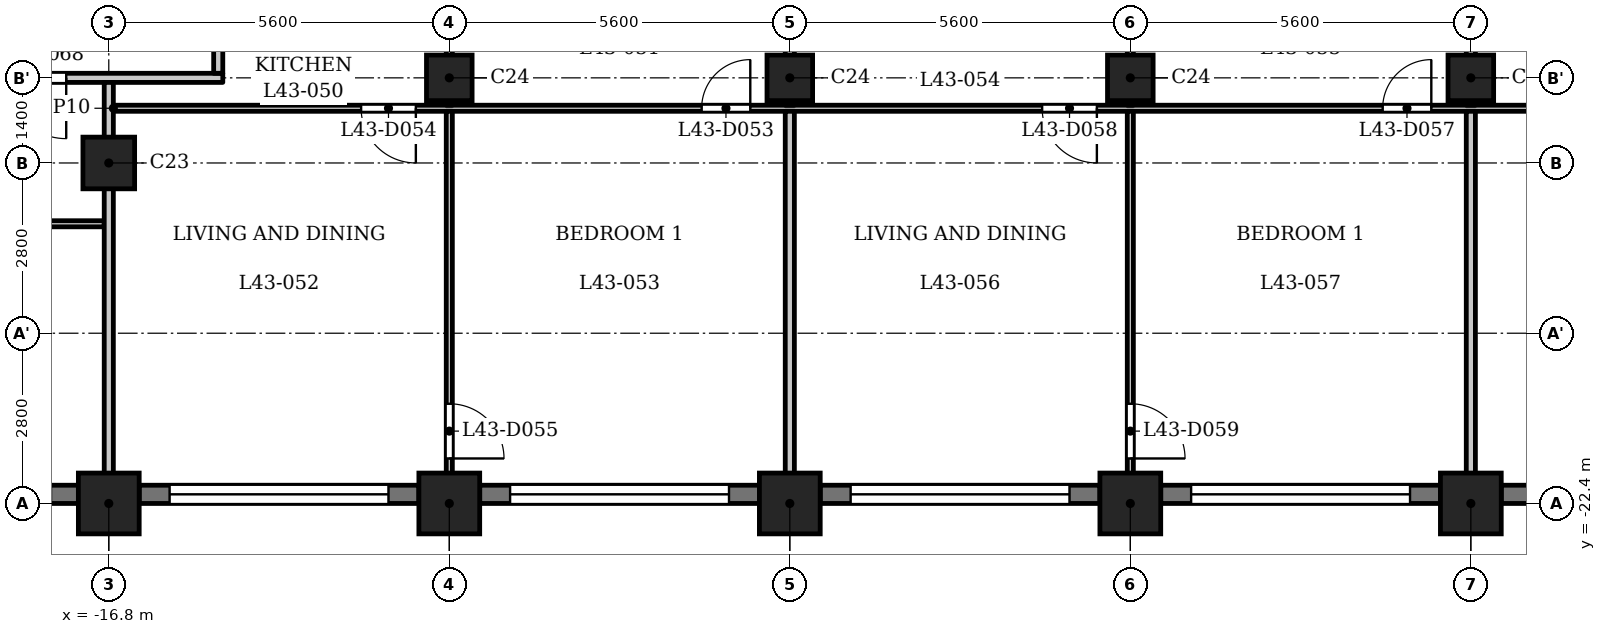
"""IFC4 building model, lengths in metres.
Left out: names, types, materials, properties, quantities, classifications, styles, units other than length and angle.
Written with IfcOpenShell. Run it as: python <this file> out.ifc"""

import sys

from ifc_helpers import new_model, si_unit, direction, frame, frame_2d, origin, origin_2d, place, context, subcontext, project, spatial, rectangle, extrude, element, fill, save


model = new_model("IFC4")
c1 = context("Model", 3, precision=1e-05, world=origin(), true_north=direction((0.0, 1.0)))
c2 = subcontext(c1, "Body", "Model", "MODEL_VIEW")
j1 = project(units=[si_unit("LENGTHUNIT", "METRE"), si_unit("PLANEANGLEUNIT", "RADIAN")], contexts=[c1])
p1 = place(None, origin())
s1 = spatial("IfcSite", under=j1, at=p1, CompositionType="ELEMENT")
p2 = place(p1, origin())
s2 = spatial("IfcBuilding", under=s1, at=p2, CompositionType="ELEMENT")
p3 = place(p2, frame((0.0, 0.0, 167.6)))
s3 = spatial("IfcBuildingStorey", under=s2, at=p3, CompositionType="ELEMENT", Elevation=167.6)
for number, where, z_axis, x_axis in (
    (1, (-16.8, -22.4, 0.0), (0.0, 0.0, 1.0), (1.0, 0.0, 0.0)),
    (2, (-11.2, -22.4, 0.0), (0.0, 0.0, 1.0), (1.0, 0.0, 0.0)),
    (3, (-5.6, -22.4, 0.0), (0.0, 0.0, 1.0), (1.0, 0.0, 0.0)),
    (4, (0.0, -22.4, 0.0), (0.0, 0.0, 1.0), (1.0, 0.0, 0.0)),
    (5, (5.6, -22.4, 0.0), (0.0, 0.0, 1.0), (1.0, 0.0, 0.0)),
):
    element("IfcColumn", number, at=place(p3, frame(where, z_axis=z_axis, x_axis=x_axis)), inside=s3, PredefinedType="COLUMN", context=c2, shape_type="SweptSolid", body=[
        extrude(rectangle(XDim=1.0, YDim=1.0, at=origin_2d()), origin(), (0.0, 0.0, 1.0), 3.5),
    ])
p4 = place(p3, frame((-16.8, -16.8, 0.0), z_axis=(0.0, 0.0, 1.0), x_axis=(1.0, 0.0, 0.0)))
e6 = element("IfcColumn", 6, at=p4, inside=s3, PredefinedType="COLUMN", context=c2, shape_type="SweptSolid", body=[
    extrude(rectangle(XDim=0.85, YDim=0.85, at=origin_2d()), origin(), (0.0, 0.0, 1.0), 3.5),
])
for number, where, z_axis, x_axis in (
    (7, (-11.2, -15.4, 0.0), (0.0, 0.0, 1.0), (1.0, 0.0, 0.0)),
    (8, (-5.6, -15.4, 0.0), (0.0, 0.0, 1.0), (1.0, 0.0, 0.0)),
    (9, (0.0, -15.4, 0.0), (0.0, 0.0, 1.0), (1.0, 0.0, 0.0)),
    (10, (5.6, -15.4, 0.0), (0.0, 0.0, 1.0), (1.0, 0.0, 0.0)),
):
    element("IfcColumn", number, at=place(p3, frame(where, z_axis=z_axis, x_axis=x_axis)), inside=s3, PredefinedType="COLUMN", context=c2, shape_type="SweptSolid", body=[
        extrude(rectangle(XDim=0.75, YDim=0.75, at=origin_2d()), origin(), (0.0, 0.0, 1.0), 3.5),
    ])
p5 = place(p3, frame((-20.0, -22.25, 0.0), z_axis=(0.0, 0.0, 1.0), x_axis=(1.0, 0.0, 0.0)))
e11 = element("IfcWall", 11, at=p5, inside=s3, PredefinedType="SOLIDWALL", context=c2, shape_type="SweptSolid", body=[
    extrude(rectangle(XDim=2.7, YDim=0.3, at=frame_2d((1.35, 0.0))), origin(), (0.0, 0.0, 1.0), 2.45),
])
p6 = place(p5, frame((0.45, 0.0, 0.9)))
e12 = element("IfcOpeningElement", 12, at=p6, cuts=e11, PredefinedType="OPENING", context=c2, shape_type="SweptSolid", body=[
    extrude(rectangle(XDim=1.8, YDim=1.25, at=frame_2d((0.9, 0.625))), frame((0.0, 0.16, 0.0), z_axis=(0.0, -1.0, 0.0), x_axis=(1.0, 0.0, 0.0)), (0.0, 0.0, 1.0), 0.32),
])
p7 = place(p3, frame((-16.3, -22.25, 0.0), z_axis=(0.0, 0.0, 1.0), x_axis=(1.0, 0.0, 0.0)))
e13 = element("IfcWall", 13, at=p7, inside=s3, PredefinedType="SOLIDWALL", context=c2, shape_type="SweptSolid", body=[
    extrude(rectangle(XDim=4.6, YDim=0.3, at=frame_2d((2.3, 0.0))), origin(), (0.0, 0.0, 1.0), 2.45),
])
p8 = place(p7, frame((0.5, 0.0, 1.2)))
e14 = element("IfcOpeningElement", 14, at=p8, cuts=e13, PredefinedType="OPENING", context=c2, shape_type="SweptSolid", body=[
    extrude(rectangle(XDim=3.6, YDim=0.95, at=frame_2d((1.8, 0.475))), frame((0.0, 0.16, 0.0), z_axis=(0.0, -1.0, 0.0), x_axis=(1.0, 0.0, 0.0)), (0.0, 0.0, 1.0), 0.32),
])
p9 = place(p3, frame((-10.7, -22.25, 0.0), z_axis=(0.0, 0.0, 1.0), x_axis=(1.0, 0.0, 0.0)))
e15 = element("IfcWall", 15, at=p9, inside=s3, PredefinedType="SOLIDWALL", context=c2, shape_type="SweptSolid", body=[
    extrude(rectangle(XDim=4.6, YDim=0.3, at=frame_2d((2.3, 0.0))), origin(), (0.0, 0.0, 1.0), 2.45),
])
p10 = place(p9, frame((0.5, 0.0, 1.2)))
e16 = element("IfcOpeningElement", 16, at=p10, cuts=e15, PredefinedType="OPENING", context=c2, shape_type="SweptSolid", body=[
    extrude(rectangle(XDim=3.6, YDim=0.95, at=frame_2d((1.8, 0.475))), frame((0.0, 0.16, 0.0), z_axis=(0.0, -1.0, 0.0), x_axis=(1.0, 0.0, 0.0)), (0.0, 0.0, 1.0), 0.32),
])
p11 = place(p3, frame((-5.1, -22.25, 0.0), z_axis=(0.0, 0.0, 1.0), x_axis=(1.0, 0.0, 0.0)))
e17 = element("IfcWall", 17, at=p11, inside=s3, PredefinedType="SOLIDWALL", context=c2, shape_type="SweptSolid", body=[
    extrude(rectangle(XDim=4.6, YDim=0.3, at=frame_2d((2.3, 0.0))), origin(), (0.0, 0.0, 1.0), 2.45),
])
p12 = place(p11, frame((0.5, 0.0, 1.2)))
e18 = element("IfcOpeningElement", 18, at=p12, cuts=e17, PredefinedType="OPENING", context=c2, shape_type="SweptSolid", body=[
    extrude(rectangle(XDim=3.6, YDim=0.95, at=frame_2d((1.8, 0.475))), frame((0.0, 0.16, 0.0), z_axis=(0.0, -1.0, 0.0), x_axis=(1.0, 0.0, 0.0)), (0.0, 0.0, 1.0), 0.32),
])
p13 = place(p3, frame((0.5, -22.25, 0.0), z_axis=(0.0, 0.0, 1.0), x_axis=(1.0, 0.0, 0.0)))
e19 = element("IfcWall", 19, at=p13, inside=s3, PredefinedType="SOLIDWALL", context=c2, shape_type="SweptSolid", body=[
    extrude(rectangle(XDim=4.6, YDim=0.3, at=frame_2d((2.3, 0.0))), origin(), (0.0, 0.0, 1.0), 2.45),
])
p14 = place(p13, frame((0.5, 0.0, 1.2)))
e20 = element("IfcOpeningElement", 20, at=p14, cuts=e19, PredefinedType="OPENING", context=c2, shape_type="SweptSolid", body=[
    extrude(rectangle(XDim=3.6, YDim=0.95, at=frame_2d((1.8, 0.475))), frame((0.0, 0.16, 0.0), z_axis=(0.0, -1.0, 0.0), x_axis=(1.0, 0.0, 0.0)), (0.0, 0.0, 1.0), 0.32),
])
p15 = place(p3, frame((6.1, -22.25, 0.0), z_axis=(0.0, 0.0, 1.0), x_axis=(1.0, 0.0, 0.0)))
e21 = element("IfcWall", 21, at=p15, inside=s3, PredefinedType="SOLIDWALL", context=c2, shape_type="SweptSolid", body=[
    extrude(rectangle(XDim=4.6, YDim=0.3, at=frame_2d((2.3, 0.0))), origin(), (0.0, 0.0, 1.0), 2.45),
])
p16 = place(p15, frame((0.5, 0.0, 1.2)))
e22 = element("IfcOpeningElement", 22, at=p16, cuts=e21, PredefinedType="OPENING", context=c2, shape_type="SweptSolid", body=[
    extrude(rectangle(XDim=3.6, YDim=0.95, at=frame_2d((1.8, 0.475))), frame((0.0, 0.16, 0.0), z_axis=(0.0, -1.0, 0.0), x_axis=(1.0, 0.0, 0.0)), (0.0, 0.0, 1.0), 0.32),
])
p17 = place(p3, frame((-26.394, -17.8, 0.0), z_axis=(0.0, 0.0, 1.0), x_axis=(1.0, 0.0, 0.0)))
e23 = element("IfcWall", 23, at=p17, inside=s3, PredefinedType="PARTITIONING", context=c2, shape_type="SweptSolid", body=[
    extrude(rectangle(XDim=9.519, YDim=0.1, at=frame_2d((4.76, 0.0))), origin(), (0.0, 0.0, 1.0), 3.2),
])
p18 = place(p17, frame((2.544, 0.0, 0.0)))
e24 = element("IfcOpeningElement", 24, at=p18, cuts=e23, PredefinedType="OPENING", context=c2, shape_type="SweptSolid", body=[
    extrude(rectangle(XDim=0.8, YDim=2.1, at=frame_2d((0.4, 1.05))), frame((0.0, 0.06, 0.0), z_axis=(0.0, -1.0, 0.0), x_axis=(1.0, 0.0, 0.0)), (0.0, 0.0, 1.0), 0.12),
])
p19 = place(p17, frame((6.894, 0.0, 0.0)))
e25 = element("IfcOpeningElement", 25, at=p19, cuts=e23, PredefinedType="OPENING", context=c2, shape_type="SweptSolid", body=[
    extrude(rectangle(XDim=0.9, YDim=2.1, at=frame_2d((0.45, 1.05))), frame((0.0, 0.06, 0.0), z_axis=(0.0, -1.0, 0.0), x_axis=(1.0, 0.0, 0.0)), (0.0, 0.0, 1.0), 0.12),
])
p20 = place(p3, frame((-16.725, -15.9, 0.0), z_axis=(0.0, 0.0, 1.0), x_axis=(1.0, 0.0, 0.0)))
e26 = element("IfcWall", 26, at=p20, inside=s3, PredefinedType="PARTITIONING", context=c2, shape_type="SweptSolid", body=[
    extrude(rectangle(XDim=33.45, YDim=0.1, at=frame_2d((16.725, 0.0))), origin(), (0.0, 0.0, 1.0), 3.2),
])
p21 = place(p20, frame((9.675, 0.0, 0.0)))
e27 = element("IfcOpeningElement", 27, at=p21, cuts=e26, PredefinedType="OPENING", context=c2, shape_type="SweptSolid", body=[
    extrude(rectangle(XDim=0.8, YDim=2.1, at=frame_2d((0.4, 1.05))), frame((0.0, 0.06, 0.0), z_axis=(0.0, -1.0, 0.0), x_axis=(1.0, 0.0, 0.0)), (0.0, 0.0, 1.0), 0.12),
])
p22 = place(p20, frame((4.075, 0.0, 0.0)))
e28 = element("IfcOpeningElement", 28, at=p22, cuts=e26, PredefinedType="OPENING", context=c2, shape_type="SweptSolid", body=[
    extrude(rectangle(XDim=0.9, YDim=2.1, at=frame_2d((0.45, 1.05))), frame((0.0, 0.06, 0.0), z_axis=(0.0, -1.0, 0.0), x_axis=(1.0, 0.0, 0.0)), (0.0, 0.0, 1.0), 0.12),
])
p23 = place(p20, frame((20.875, 0.0, 0.0)))
e29 = element("IfcOpeningElement", 29, at=p23, cuts=e26, PredefinedType="OPENING", context=c2, shape_type="SweptSolid", body=[
    extrude(rectangle(XDim=0.8, YDim=2.1, at=frame_2d((0.4, 1.05))), frame((0.0, 0.06, 0.0), z_axis=(0.0, -1.0, 0.0), x_axis=(1.0, 0.0, 0.0)), (0.0, 0.0, 1.0), 0.12),
])
p24 = place(p20, frame((15.275, 0.0, 0.0)))
e30 = element("IfcOpeningElement", 30, at=p24, cuts=e26, PredefinedType="OPENING", context=c2, shape_type="SweptSolid", body=[
    extrude(rectangle(XDim=0.9, YDim=2.1, at=frame_2d((0.45, 1.05))), frame((0.0, 0.06, 0.0), z_axis=(0.0, -1.0, 0.0), x_axis=(1.0, 0.0, 0.0)), (0.0, 0.0, 1.0), 0.12),
])
p25 = place(p20, frame((30.825, 0.0, 0.0)))
e31 = element("IfcOpeningElement", 31, at=p25, cuts=e26, PredefinedType="OPENING", context=c2, shape_type="SweptSolid", body=[
    extrude(rectangle(XDim=0.8, YDim=2.1, at=frame_2d((0.4, 1.05))), frame((0.0, 0.06, 0.0), z_axis=(0.0, -1.0, 0.0), x_axis=(1.0, 0.0, 0.0)), (0.0, 0.0, 1.0), 0.12),
])
p26 = place(p20, frame((26.475, 0.0, 0.0)))
e32 = element("IfcOpeningElement", 32, at=p26, cuts=e26, PredefinedType="OPENING", context=c2, shape_type="SweptSolid", body=[
    extrude(rectangle(XDim=0.9, YDim=2.1, at=frame_2d((0.45, 1.05))), frame((0.0, 0.06, 0.0), z_axis=(0.0, -1.0, 0.0), x_axis=(1.0, 0.0, 0.0)), (0.0, 0.0, 1.0), 0.12),
])
p27 = place(p3, frame((-27.484, -15.4, 0.0), z_axis=(0.0, 0.0, 1.0), x_axis=(1.0, 0.0, 0.0)))
e33 = element("IfcWall", 33, at=p27, inside=s3, PredefinedType="PARTITIONING", context=c2, shape_type="SweptSolid", body=[
    extrude(rectangle(XDim=12.559, YDim=0.15, at=frame_2d((6.279, 0.0))), origin(), (0.0, 0.0, 1.0), 3.2),
])
p28 = place(p27, frame((8.984, 0.0, 0.0)))
e34 = element("IfcOpeningElement", 34, at=p28, cuts=e33, PredefinedType="OPENING", context=c2, shape_type="SweptSolid", body=[
    extrude(rectangle(XDim=1.0, YDim=2.1, at=frame_2d((0.5, 1.05))), frame((0.0, 0.085, 0.0), z_axis=(0.0, -1.0, 0.0), x_axis=(1.0, 0.0, 0.0)), (0.0, 0.0, 1.0), 0.17),
])
p29 = place(p3, frame((-16.8, -22.88, 0.0), z_axis=(0.0, 0.0, 1.0), x_axis=(0.0, 1.0, 0.0)))
e35 = element("IfcWall", 35, at=p29, inside=s3, PredefinedType="PARTITIONING", context=c2, shape_type="SweptSolid", body=[
    extrude(rectangle(XDim=7.405, YDim=0.15, at=frame_2d((3.702, 0.0))), origin(), (0.0, 0.0, 1.0), 3.2),
])
p30 = place(p3, frame((-15.0, -15.325, 0.0), z_axis=(0.0, 0.0, 1.0), x_axis=(0.0, 1.0, 0.0)))
e36 = element("IfcWall", 36, at=p30, inside=s3, PredefinedType="PARTITIONING", context=c2, shape_type="SweptSolid", body=[
    extrude(rectangle(XDim=2.05, YDim=0.15, at=frame_2d((1.025, 0.0))), origin(), (0.0, 0.0, 1.0), 3.2),
])
p31 = place(p30, frame((0.574, 0.0, 0.0)))
e37 = element("IfcOpeningElement", 37, at=p31, cuts=e36, PredefinedType="OPENING", context=c2, shape_type="SweptSolid", body=[
    extrude(rectangle(XDim=1.0, YDim=2.1, at=frame_2d((0.5, 1.05))), frame((0.0, 0.085, 0.0), z_axis=(0.0, -1.0, 0.0), x_axis=(1.0, 0.0, 0.0)), (0.0, 0.0, 1.0), 0.17),
])
p32 = place(p3, frame((-11.2, -22.88, 0.0), z_axis=(0.0, 0.0, 1.0), x_axis=(0.0, 1.0, 0.0)))
e38 = element("IfcWall", 38, at=p32, inside=s3, PredefinedType="PARTITIONING", context=c2, shape_type="SweptSolid", body=[
    extrude(rectangle(XDim=6.93, YDim=0.1, at=frame_2d((3.465, 0.0))), origin(), (0.0, 0.0, 1.0), 3.2),
])
p33 = place(p32, frame((1.22, 0.0, 0.0)))
e39 = element("IfcOpeningElement", 39, at=p33, cuts=e38, PredefinedType="OPENING", context=c2, shape_type="SweptSolid", body=[
    extrude(rectangle(XDim=0.9, YDim=2.1, at=frame_2d((0.45, 1.05))), frame((0.0, 0.06, 0.0), z_axis=(0.0, -1.0, 0.0), x_axis=(1.0, 0.0, 0.0)), (0.0, 0.0, 1.0), 0.12),
])
p34 = place(p3, frame((-11.2, -15.85, 0.0), z_axis=(0.0, 0.0, 1.0), x_axis=(0.0, 1.0, 0.0)))
e40 = element("IfcWall", 40, at=p34, inside=s3, PredefinedType="PARTITIONING", context=c2, shape_type="SweptSolid", body=[
    extrude(rectangle(XDim=2.575, YDim=0.1, at=frame_2d((1.288, 0.0))), origin(), (0.0, 0.0, 1.0), 3.2),
])
p35 = place(p3, frame((-5.6, -22.88, 0.0), z_axis=(0.0, 0.0, 1.0), x_axis=(0.0, 1.0, 0.0)))
e41 = element("IfcWall", 41, at=p35, inside=s3, PredefinedType="PARTITIONING", context=c2, shape_type="SweptSolid", body=[
    extrude(rectangle(XDim=6.93, YDim=0.15, at=frame_2d((3.465, 0.0))), origin(), (0.0, 0.0, 1.0), 3.2),
])
p36 = place(p3, frame((-5.6, -15.85, 0.0), z_axis=(0.0, 0.0, 1.0), x_axis=(0.0, 1.0, 0.0)))
e42 = element("IfcWall", 42, at=p36, inside=s3, PredefinedType="PARTITIONING", context=c2, shape_type="SweptSolid", body=[
    extrude(rectangle(XDim=2.575, YDim=0.15, at=frame_2d((1.288, 0.0))), origin(), (0.0, 0.0, 1.0), 3.2),
])
p37 = place(p3, frame((0.0, -22.88, 0.0), z_axis=(0.0, 0.0, 1.0), x_axis=(0.0, 1.0, 0.0)))
e43 = element("IfcWall", 43, at=p37, inside=s3, PredefinedType="PARTITIONING", context=c2, shape_type="SweptSolid", body=[
    extrude(rectangle(XDim=6.93, YDim=0.1, at=frame_2d((3.465, 0.0))), origin(), (0.0, 0.0, 1.0), 3.2),
])
p38 = place(p37, frame((1.22, 0.0, 0.0)))
e44 = element("IfcOpeningElement", 44, at=p38, cuts=e43, PredefinedType="OPENING", context=c2, shape_type="SweptSolid", body=[
    extrude(rectangle(XDim=0.9, YDim=2.1, at=frame_2d((0.45, 1.05))), frame((0.0, 0.06, 0.0), z_axis=(0.0, -1.0, 0.0), x_axis=(1.0, 0.0, 0.0)), (0.0, 0.0, 1.0), 0.12),
])
p39 = place(p3, frame((0.0, -15.85, 0.0), z_axis=(0.0, 0.0, 1.0), x_axis=(0.0, 1.0, 0.0)))
e45 = element("IfcWall", 45, at=p39, inside=s3, PredefinedType="PARTITIONING", context=c2, shape_type="SweptSolid", body=[
    extrude(rectangle(XDim=2.575, YDim=0.1, at=frame_2d((1.288, 0.0))), origin(), (0.0, 0.0, 1.0), 3.2),
])
p40 = place(p3, frame((5.6, -22.88, 0.0), z_axis=(0.0, 0.0, 1.0), x_axis=(0.0, 1.0, 0.0)))
e46 = element("IfcWall", 46, at=p40, inside=s3, PredefinedType="PARTITIONING", context=c2, shape_type="SweptSolid", body=[
    extrude(rectangle(XDim=6.93, YDim=0.15, at=frame_2d((3.465, 0.0))), origin(), (0.0, 0.0, 1.0), 3.2),
])
p41 = place(p3, frame((5.6, -15.85, 0.0), z_axis=(0.0, 0.0, 1.0), x_axis=(0.0, 1.0, 0.0)))
e47 = element("IfcWall", 47, at=p41, inside=s3, PredefinedType="PARTITIONING", context=c2, shape_type="SweptSolid", body=[
    extrude(rectangle(XDim=2.575, YDim=0.15, at=frame_2d((1.288, 0.0))), origin(), (0.0, 0.0, 1.0), 3.2),
])
p42 = place(p21, origin())
e48 = element("IfcDoor", 48, at=p42, inside=s3, OperationType="SINGLE_SWING_LEFT", PredefinedType="DOOR", context=c2, shape_type="SweptSolid", body=[
    extrude(rectangle(XDim=0.8, YDim=2.1, at=frame_2d((0.4, 1.05))), frame((0.0, 0.025, 0.0), z_axis=(0.0, -1.0, 0.0), x_axis=(1.0, 0.0, 0.0)), (0.0, 0.0, 1.0), 0.05),
])
fill(e27, e48)
p43 = place(p22, origin())
e49 = element("IfcDoor", 49, at=p43, inside=s3, OperationType="SINGLE_SWING_RIGHT", PredefinedType="DOOR", context=c2, shape_type="SweptSolid", body=[
    extrude(rectangle(XDim=0.9, YDim=2.1, at=frame_2d((0.45, 1.05))), frame((0.0, 0.025, 0.0), z_axis=(0.0, -1.0, 0.0), x_axis=(1.0, 0.0, 0.0)), (0.0, 0.0, 1.0), 0.05),
])
fill(e28, e49)
p44 = place(p33, origin())
e50 = element("IfcDoor", 50, at=p44, inside=s3, OperationType="SINGLE_SWING_LEFT", PredefinedType="DOOR", context=c2, shape_type="SweptSolid", body=[
    extrude(rectangle(XDim=0.9, YDim=2.1, at=frame_2d((0.45, 1.05))), frame((0.0, 0.025, 0.0), z_axis=(0.0, -1.0, 0.0), x_axis=(1.0, 0.0, 0.0)), (0.0, 0.0, 1.0), 0.05),
])
fill(e39, e50)
p45 = place(p23, origin())
e51 = element("IfcDoor", 51, at=p45, inside=s3, OperationType="SINGLE_SWING_LEFT", PredefinedType="DOOR", context=c2, shape_type="SweptSolid", body=[
    extrude(rectangle(XDim=0.8, YDim=2.1, at=frame_2d((0.4, 1.05))), frame((0.0, 0.025, 0.0), z_axis=(0.0, -1.0, 0.0), x_axis=(1.0, 0.0, 0.0)), (0.0, 0.0, 1.0), 0.05),
])
fill(e29, e51)
p46 = place(p24, origin())
e52 = element("IfcDoor", 52, at=p46, inside=s3, OperationType="SINGLE_SWING_RIGHT", PredefinedType="DOOR", context=c2, shape_type="SweptSolid", body=[
    extrude(rectangle(XDim=0.9, YDim=2.1, at=frame_2d((0.45, 1.05))), frame((0.0, 0.025, 0.0), z_axis=(0.0, -1.0, 0.0), x_axis=(1.0, 0.0, 0.0)), (0.0, 0.0, 1.0), 0.05),
])
fill(e30, e52)
p47 = place(p38, origin())
e53 = element("IfcDoor", 53, at=p47, inside=s3, OperationType="SINGLE_SWING_LEFT", PredefinedType="DOOR", context=c2, shape_type="SweptSolid", body=[
    extrude(rectangle(XDim=0.9, YDim=2.1, at=frame_2d((0.45, 1.05))), frame((0.0, 0.025, 0.0), z_axis=(0.0, -1.0, 0.0), x_axis=(1.0, 0.0, 0.0)), (0.0, 0.0, 1.0), 0.05),
])
fill(e44, e53)
p48 = place(p28, origin())
e54 = element("IfcDoor", 54, at=p48, inside=s3, OperationType="SINGLE_SWING_RIGHT", PredefinedType="DOOR", context=c2, shape_type="SweptSolid", body=[
    extrude(rectangle(XDim=1.0, YDim=2.1, at=frame_2d((0.5, 1.05))), frame((0.0, 0.025, 0.0), z_axis=(0.0, -1.0, 0.0), x_axis=(1.0, 0.0, 0.0)), (0.0, 0.0, 1.0), 0.05),
])
fill(e34, e54)
p49 = place(p8, origin())
e55 = element("IfcWindow", 55, at=p49, inside=s3, PartitioningType="SINGLE_PANEL", PredefinedType="WINDOW", context=c2, shape_type="SweptSolid", body=[
    extrude(rectangle(XDim=3.6, YDim=0.95, at=frame_2d((1.8, 0.475))), frame((0.0, 0.03, 0.0), z_axis=(0.0, -1.0, 0.0), x_axis=(1.0, 0.0, 0.0)), (0.0, 0.0, 1.0), 0.06),
])
fill(e14, e55)
p50 = place(p10, origin())
e56 = element("IfcWindow", 56, at=p50, inside=s3, PartitioningType="SINGLE_PANEL", PredefinedType="WINDOW", context=c2, shape_type="SweptSolid", body=[
    extrude(rectangle(XDim=3.6, YDim=0.95, at=frame_2d((1.8, 0.475))), frame((0.0, 0.03, 0.0), z_axis=(0.0, -1.0, 0.0), x_axis=(1.0, 0.0, 0.0)), (0.0, 0.0, 1.0), 0.06),
])
fill(e16, e56)
p51 = place(p12, origin())
e57 = element("IfcWindow", 57, at=p51, inside=s3, PartitioningType="SINGLE_PANEL", PredefinedType="WINDOW", context=c2, shape_type="SweptSolid", body=[
    extrude(rectangle(XDim=3.6, YDim=0.95, at=frame_2d((1.8, 0.475))), frame((0.0, 0.03, 0.0), z_axis=(0.0, -1.0, 0.0), x_axis=(1.0, 0.0, 0.0)), (0.0, 0.0, 1.0), 0.06),
])
fill(e18, e57)
p52 = place(p14, origin())
e58 = element("IfcWindow", 58, at=p52, inside=s3, PartitioningType="SINGLE_PANEL", PredefinedType="WINDOW", context=c2, shape_type="SweptSolid", body=[
    extrude(rectangle(XDim=3.6, YDim=0.95, at=frame_2d((1.8, 0.475))), frame((0.0, 0.03, 0.0), z_axis=(0.0, -1.0, 0.0), x_axis=(1.0, 0.0, 0.0)), (0.0, 0.0, 1.0), 0.06),
])
fill(e20, e58)
save(model, sys.argv[1])
